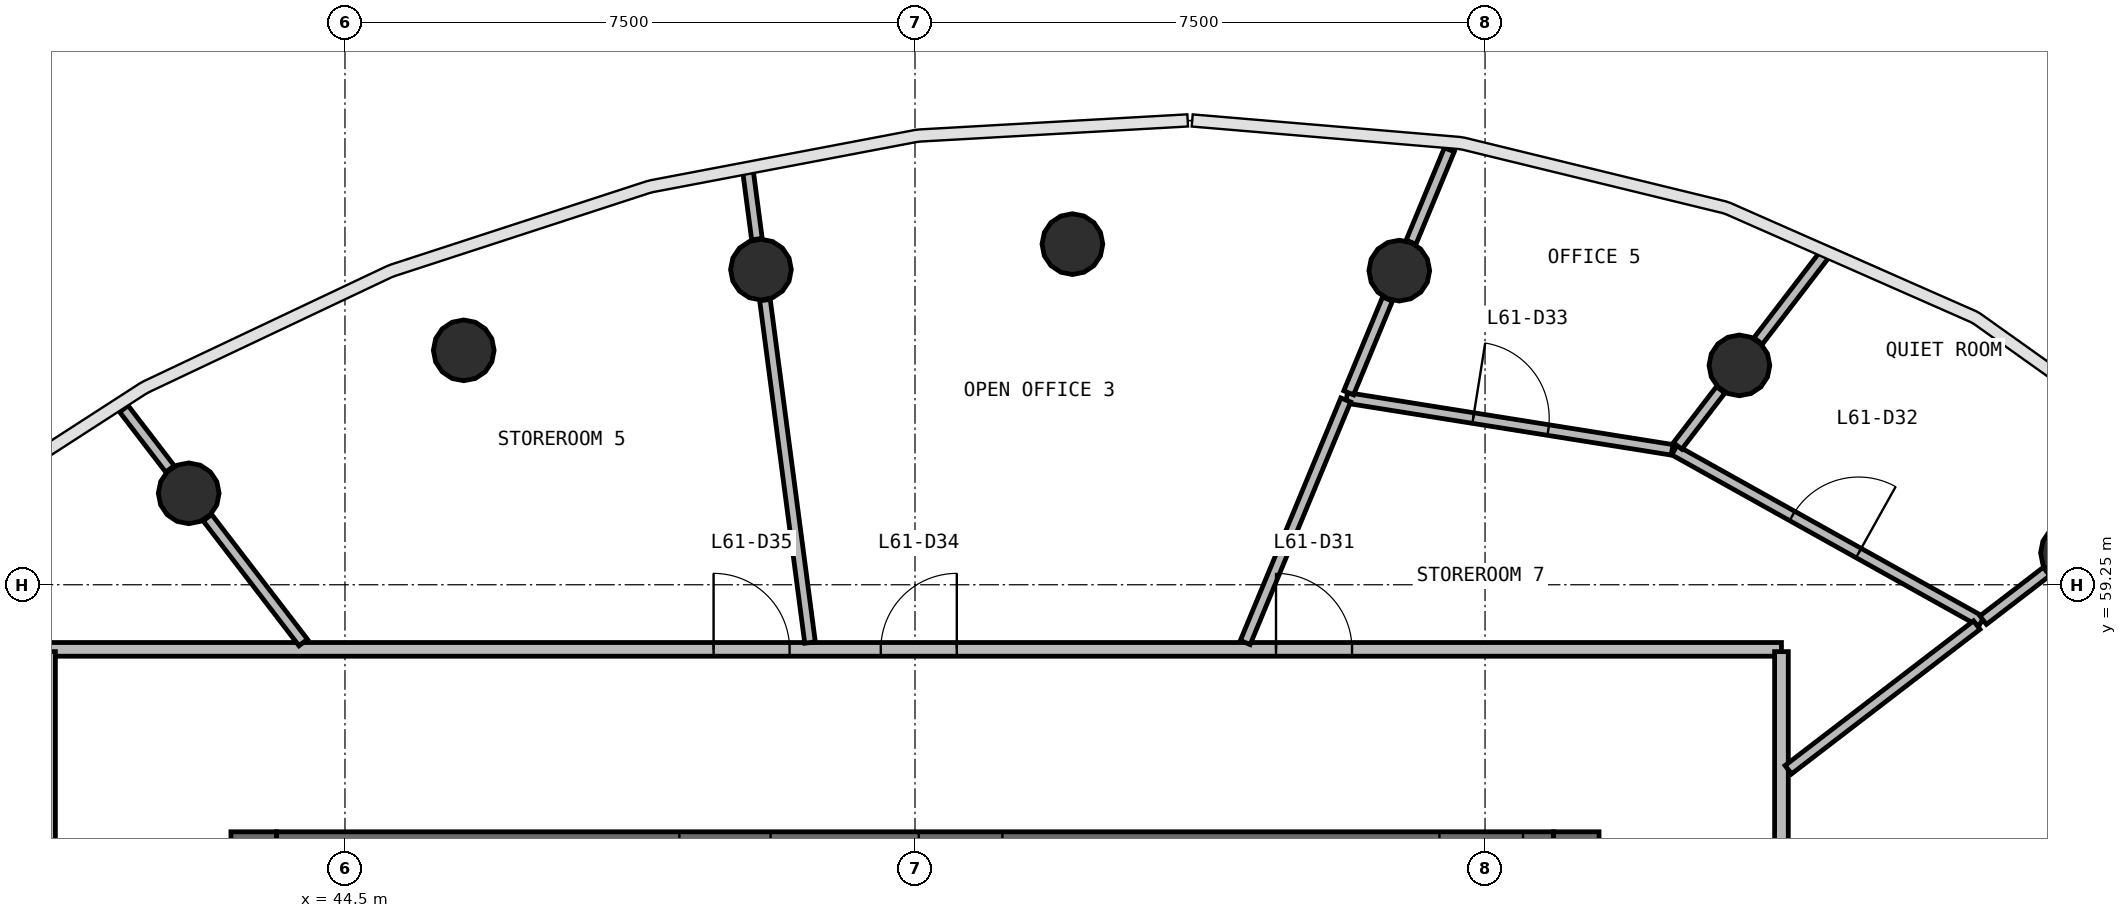
"""IFC4 building model, lengths in metres.
Left out: names, types, materials, properties, quantities, classifications, styles, units other than length and angle.
Written with IfcOpenShell. Run it as: python <this file> out.ifc"""

import sys

from ifc_helpers import new_model, si_unit, direction, frame, frame_2d, origin, origin_2d, place, context, subcontext, project, spatial, rectangle, circle, extrude, source, transform, mapped, element, fill, save


model = new_model("IFC4")
c1 = context("Model", 3, precision=1e-05, world=origin(), true_north=direction((0.0, 1.0)))
c2 = subcontext(c1, "Body", "Model", "MODEL_VIEW")
j1 = project(units=[si_unit("LENGTHUNIT", "METRE"), si_unit("PLANEANGLEUNIT", "RADIAN")], contexts=[c1])
p1 = place(None, origin())
s1 = spatial("IfcSite", under=j1, at=p1, CompositionType="ELEMENT")
p2 = place(p1, origin())
s2 = spatial("IfcBuilding", under=s1, at=p2, CompositionType="ELEMENT")
p3 = place(p2, frame((0.0, 0.0, 250.1)))
s3 = spatial("IfcBuildingStorey", under=s2, at=p3, CompositionType="ELEMENT", Elevation=250.1)
p4 = place(p3, frame((60.7, 40.0, 0.0), z_axis=(0.0, 0.0, 1.0), x_axis=(0.0, 1.0, 0.0)))
e1 = element("IfcWall", 1, at=p4, inside=s3, PredefinedType="SHEAR", context=c2, shape_type="SweptSolid", body=[
    extrude(rectangle(XDim=16.0, YDim=0.6, at=frame_2d((8.0, 0.0))), origin(), (0.0, 0.0, 1.0), 3.9),
])
p5 = place(p4, frame((7.1, 0.0, 0.0)))
e2 = element("IfcOpeningElement", 2, at=p5, cuts=e1, PredefinedType="OPENING", context=c2, shape_type="SweptSolid", body=[
    extrude(rectangle(XDim=1.8, YDim=2.1, at=frame_2d((0.9, 1.05))), frame((0.0, 0.31, 0.0), z_axis=(0.0, -1.0, 0.0), x_axis=(1.0, 0.0, 0.0)), (0.0, 0.0, 1.0), 0.62),
])
p6 = place(p3, frame((43.3, 56.0, 0.0), z_axis=(0.0, 0.0, 1.0), x_axis=(0.0, -1.0, 0.0)))
e3 = element("IfcWall", 3, at=p6, inside=s3, PredefinedType="SHEAR", context=c2, shape_type="SweptSolid", body=[
    extrude(rectangle(XDim=16.0, YDim=0.6, at=frame_2d((8.0, 0.0))), origin(), (0.0, 0.0, 1.0), 3.9),
])
p7 = place(p6, frame((7.1, 0.0, 0.0)))
e4 = element("IfcOpeningElement", 4, at=p7, cuts=e3, PredefinedType="OPENING", context=c2, shape_type="SweptSolid", body=[
    extrude(rectangle(XDim=1.8, YDim=2.1, at=frame_2d((0.9, 1.05))), frame((0.0, 0.31, 0.0), z_axis=(0.0, -1.0, 0.0), x_axis=(1.0, 0.0, 0.0)), (0.0, 0.0, 1.0), 0.62),
])
p8 = place(p3, frame((60.4, 55.7, 0.0), z_axis=(0.0, 0.0, 1.0), x_axis=(-1.0, 0.0, 0.0)))
e5 = element("IfcWall", 5, at=p8, inside=s3, PredefinedType="SHEAR", context=c2, shape_type="SweptSolid", body=[
    extrude(rectangle(XDim=16.8, YDim=0.6, at=frame_2d((8.4, 0.0))), origin(), (0.0, 0.0, 1.0), 3.9),
])
p9 = place(p8, frame((0.4, 0.0, 0.0)))
e6 = element("IfcOpeningElement", 6, at=p9, cuts=e5, PredefinedType="OPENING", context=c2, shape_type="SweptSolid", body=[
    extrude(rectangle(XDim=1.1, YDim=2.1, at=frame_2d((0.55, 1.05))), frame((0.0, 0.31, 0.0), z_axis=(0.0, -1.0, 0.0), x_axis=(1.0, 0.0, 0.0)), (0.0, 0.0, 1.0), 0.62),
])
p10 = place(p8, frame((10.3, 0.0, 0.0)))
e7 = element("IfcOpeningElement", 7, at=p10, cuts=e5, PredefinedType="OPENING", context=c2, shape_type="SweptSolid", body=[
    extrude(rectangle(XDim=1.2, YDim=2.1, at=frame_2d((0.6, 1.05))), frame((0.0, 0.31, 0.0), z_axis=(0.0, -1.0, 0.0), x_axis=(1.0, 0.0, 0.0)), (0.0, 0.0, 1.0), 0.62),
])
p11 = place(p8, frame((7.25, 0.0, 0.0)))
e8 = element("IfcOpeningElement", 8, at=p11, cuts=e5, PredefinedType="OPENING", context=c2, shape_type="SweptSolid", body=[
    extrude(rectangle(XDim=1.1, YDim=2.1, at=frame_2d((0.55, 1.05))), frame((0.0, 0.31, 0.0), z_axis=(0.0, -1.0, 0.0), x_axis=(1.0, 0.0, 0.0)), (0.0, 0.0, 1.0), 0.62),
])
m1 = source(origin(), c2, "Body", "SweptSolid", [
    extrude(circle(Radius=0.4, at=origin_2d()), origin(), (0.0, 0.0, 1.0), 3.9),
])
for number, where, z_axis, x_axis in (
    (9, (67.209, 59.671, 0.0), (0.0, 0.0, 1.0), (1.0, 0.0, 0.0)),
    (10, (62.847, 62.136, 0.0), (0.0, 0.0, 1.0), (1.0, 0.0, 0.0)),
    (11, (58.372, 63.383, 0.0), (0.0, 0.0, 1.0), (1.0, 0.0, 0.0)),
    (12, (54.071, 63.731, 0.0), (0.0, 0.0, 1.0), (1.0, 0.0, 0.0)),
    (13, (49.973, 63.396, 0.0), (0.0, 0.0, 1.0), (1.0, 0.0, 0.0)),
    (14, (46.063, 62.334, 0.0), (0.0, 0.0, 1.0), (1.0, 0.0, 0.0)),
    (15, (42.444, 60.453, 0.0), (0.0, 0.0, 1.0), (1.0, 0.0, 0.0)),
):
    element("IfcColumn", number, at=place(p3, frame(where, z_axis=z_axis, x_axis=x_axis)), inside=s3, PredefinedType="COLUMN", context=c2, shape_type="MappedRepresentation", body=[
        mapped(m1, transform((0.0, 0.0, 0.0), scale=1.0)),
    ])
p12 = place(p3, frame((40.6, 58.4, 0.0), z_axis=(0.0, 0.0, 1.0), x_axis=(1.0, 0.0, 0.0)))
e16 = element("IfcWall", 16, at=p12, inside=s3, PredefinedType="PARTITIONING", context=c2, shape_type="SweptSolid", body=[
    extrude(rectangle(XDim=22.8, YDim=0.18, at=frame_2d((11.4, 0.0))), origin(), (0.0, 0.0, 1.0), 2.88),
])
p13 = place(p12, frame((16.15, 0.0, 0.0)))
e17 = element("IfcOpeningElement", 17, at=p13, cuts=e16, PredefinedType="OPENING", context=c2, shape_type="SweptSolid", body=[
    extrude(rectangle(XDim=1.0, YDim=2.1, at=frame_2d((0.5, 1.05))), frame((0.0, 0.1, 0.0), z_axis=(0.0, -1.0, 0.0), x_axis=(1.0, 0.0, 0.0)), (0.0, 0.0, 1.0), 0.2),
])
p14 = place(p12, frame((10.95, 0.0, 0.0)))
e18 = element("IfcOpeningElement", 18, at=p14, cuts=e16, PredefinedType="OPENING", context=c2, shape_type="SweptSolid", body=[
    extrude(rectangle(XDim=1.0, YDim=2.1, at=frame_2d((0.5, 1.05))), frame((0.0, 0.1, 0.0), z_axis=(0.0, -1.0, 0.0), x_axis=(1.0, 0.0, 0.0)), (0.0, 0.0, 1.0), 0.2),
])
p15 = place(p12, frame((8.75, 0.0, 0.0)))
e19 = element("IfcOpeningElement", 19, at=p15, cuts=e16, PredefinedType="OPENING", context=c2, shape_type="SweptSolid", body=[
    extrude(rectangle(XDim=1.0, YDim=2.1, at=frame_2d((0.5, 1.05))), frame((0.0, 0.1, 0.0), z_axis=(0.0, -1.0, 0.0), x_axis=(1.0, 0.0, 0.0)), (0.0, 0.0, 1.0), 0.2),
])
p16 = place(p3, frame((63.4, 58.37, 0.0), z_axis=(0.0, 0.0, 1.0), x_axis=(0.0, -1.0, 0.0)))
e20 = element("IfcWall", 20, at=p16, inside=s3, PredefinedType="PARTITIONING", context=c2, shape_type="SweptSolid", body=[
    extrude(rectangle(XDim=20.74, YDim=0.18, at=frame_2d((10.37, 0.0))), origin(), (0.0, 0.0, 1.0), 2.88),
])
p17 = place(p16, frame((9.89, 0.0, 0.0)))
e21 = element("IfcOpeningElement", 21, at=p17, cuts=e20, PredefinedType="OPENING", context=c2, shape_type="SweptSolid", body=[
    extrude(rectangle(XDim=1.0, YDim=2.1, at=frame_2d((0.5, 1.05))), frame((0.0, 0.1, 0.0), z_axis=(0.0, -1.0, 0.0), x_axis=(1.0, 0.0, 0.0)), (0.0, 0.0, 1.0), 0.2),
])
p18 = place(p16, frame((7.69, 0.0, 0.0)))
e22 = element("IfcOpeningElement", 22, at=p18, cuts=e20, PredefinedType="OPENING", context=c2, shape_type="SweptSolid", body=[
    extrude(rectangle(XDim=1.0, YDim=2.1, at=frame_2d((0.5, 1.05))), frame((0.0, 0.1, 0.0), z_axis=(0.0, -1.0, 0.0), x_axis=(1.0, 0.0, 0.0)), (0.0, 0.0, 1.0), 0.2),
])
p19 = place(p3, frame((40.6, 37.63, 0.0), z_axis=(0.0, 0.0, 1.0), x_axis=(0.0, 1.0, 0.0)))
e23 = element("IfcWall", 23, at=p19, inside=s3, PredefinedType="PARTITIONING", context=c2, shape_type="SweptSolid", body=[
    extrude(rectangle(XDim=20.74, YDim=0.18, at=frame_2d((10.37, 0.0))), origin(), (0.0, 0.0, 1.0), 2.88),
])
p20 = place(p19, frame((7.79, 0.0, 0.0)))
e24 = element("IfcOpeningElement", 24, at=p20, cuts=e23, PredefinedType="OPENING", context=c2, shape_type="SweptSolid", body=[
    extrude(rectangle(XDim=0.9, YDim=2.1, at=frame_2d((0.45, 1.05))), frame((0.0, 0.1, 0.0), z_axis=(0.0, -1.0, 0.0), x_axis=(1.0, 0.0, 0.0)), (0.0, 0.0, 1.0), 0.2),
])
p21 = place(p19, frame((4.39, 0.0, 0.0)))
e25 = element("IfcOpeningElement", 25, at=p21, cuts=e23, PredefinedType="OPENING", context=c2, shape_type="SweptSolid", body=[
    extrude(rectangle(XDim=0.9, YDim=2.1, at=frame_2d((0.45, 1.05))), frame((0.0, 0.1, 0.0), z_axis=(0.0, -1.0, 0.0), x_axis=(1.0, 0.0, 0.0)), (0.0, 0.0, 1.0), 0.2),
])
p22 = place(p19, frame((15.49, 0.0, 0.0)))
e26 = element("IfcOpeningElement", 26, at=p22, cuts=e23, PredefinedType="OPENING", context=c2, shape_type="SweptSolid", body=[
    extrude(rectangle(XDim=1.0, YDim=2.1, at=frame_2d((0.5, 1.05))), frame((0.0, 0.1, 0.0), z_axis=(0.0, -1.0, 0.0), x_axis=(1.0, 0.0, 0.0)), (0.0, 0.0, 1.0), 0.2),
])
p23 = place(p19, frame((9.89, 0.0, 0.0)))
e27 = element("IfcOpeningElement", 27, at=p23, cuts=e23, PredefinedType="OPENING", context=c2, shape_type="SweptSolid", body=[
    extrude(rectangle(XDim=1.0, YDim=2.1, at=frame_2d((0.5, 1.05))), frame((0.0, 0.1, 0.0), z_axis=(0.0, -1.0, 0.0), x_axis=(1.0, 0.0, 0.0)), (0.0, 0.0, 1.0), 0.2),
])
p24 = place(p3, frame((50.619, 58.49, 0.0), z_axis=(0.0, 0.0, 1.0), x_axis=(-0.130505936446, 0.991447527887, 0.0)))
e28 = element("IfcWall", 28, at=p24, inside=s3, PredefinedType="PARTITIONING", context=c2, shape_type="SweptSolid", body=[
    extrude(rectangle(XDim=4.544, YDim=0.14, at=frame_2d((2.272, 0.0))), origin(), (0.0, 0.0, 1.0), 2.88),
])
p25 = place(p3, frame((61.991, 61.02, 0.0), z_axis=(0.0, 0.0, 1.0), x_axis=(0.873219638233, -0.487326854795, 0.0)))
e29 = element("IfcWall", 29, at=p25, inside=s3, PredefinedType="PARTITIONING", context=c2, shape_type="SweptSolid", body=[
    extrude(rectangle(XDim=4.626, YDim=0.14, at=frame_2d((2.313, 0.0))), origin(), (0.0, 0.0, 1.0), 2.88),
])
p26 = place(p25, frame((1.776, 0.0, 0.0)))
e30 = element("IfcOpeningElement", 30, at=p26, cuts=e29, PredefinedType="OPENING", context=c2, shape_type="SweptSolid", body=[
    extrude(rectangle(XDim=1.0, YDim=2.1, at=frame_2d((0.5, 1.05))), frame((0.0, 0.08, 0.0), z_axis=(0.0, -1.0, 0.0), x_axis=(1.0, 0.0, 0.0)), (0.0, 0.0, 1.0), 0.16),
])
p27 = place(p3, frame((57.678, 61.709, 0.0), z_axis=(0.0, 0.0, 1.0), x_axis=(0.987490815334, -0.157676534816, 0.0)))
e31 = element("IfcWall", 31, at=p27, inside=s3, PredefinedType="PARTITIONING", context=c2, shape_type="SweptSolid", body=[
    extrude(rectangle(XDim=4.337, YDim=0.14, at=frame_2d((2.168, 0.0))), origin(), (0.0, 0.0, 1.0), 2.88),
])
p28 = place(p27, frame((1.687, 0.0, 0.0)))
e32 = element("IfcOpeningElement", 32, at=p28, cuts=e31, PredefinedType="OPENING", context=c2, shape_type="SweptSolid", body=[
    extrude(rectangle(XDim=1.0, YDim=2.1, at=frame_2d((0.5, 1.05))), frame((0.0, 0.08, 0.0), z_axis=(0.0, -1.0, 0.0), x_axis=(1.0, 0.0, 0.0)), (0.0, 0.0, 1.0), 0.16),
])
p29 = place(p3, frame((56.345, 58.49, 0.0), z_axis=(0.0, 0.0, 1.0), x_axis=(0.382647254791, 0.923894516923, 0.0)))
e33 = element("IfcWall", 33, at=p29, inside=s3, PredefinedType="PARTITIONING", context=c2, shape_type="SweptSolid", body=[
    extrude(rectangle(XDim=3.454, YDim=0.14, at=frame_2d((1.727, 0.0))), origin(), (0.0, 0.0, 1.0), 2.88),
])
p30 = place(p3, frame((63.49, 56.817, 0.0), z_axis=(0.0, 0.0, 1.0), x_axis=(0.79337248494, 0.608736478404, 0.0)))
e34 = element("IfcWall", 34, at=p30, inside=s3, PredefinedType="PARTITIONING", context=c2, shape_type="SweptSolid", body=[
    extrude(rectangle(XDim=3.126, YDim=0.14, at=frame_2d((1.563, 0.0))), origin(), (0.0, 0.0, 1.0), 2.88),
])
p31 = place(p3, frame((43.951, 58.49, 0.0), z_axis=(0.0, 0.0, 1.0), x_axis=(-0.608701397958, 0.793399400128, 0.0)))
e35 = element("IfcWall", 35, at=p31, inside=s3, PredefinedType="PARTITIONING", context=c2, shape_type="SweptSolid", body=[
    extrude(rectangle(XDim=2.07, YDim=0.14, at=frame_2d((1.035, 0.0))), origin(), (0.0, 0.0, 1.0), 2.88),
])
p32 = place(p3, frame((63.093, 62.457, 0.0), z_axis=(0.0, 0.0, 1.0), x_axis=(0.608682974902, 0.793413534082, 0.0)))
e36 = element("IfcWall", 36, at=p32, inside=s3, PredefinedType="PARTITIONING", context=c2, shape_type="SweptSolid", body=[
    extrude(rectangle(XDim=1.447, YDim=0.14, at=frame_2d((0.724, 0.0))), origin(), (0.0, 0.0, 1.0), 2.88),
])
p33 = place(p3, frame((57.706, 61.775, 0.0), z_axis=(0.0, 0.0, 1.0), x_axis=(0.382718021359, 0.923865204522, 0.0)))
e37 = element("IfcWall", 37, at=p33, inside=s3, PredefinedType="PARTITIONING", context=c2, shape_type="SweptSolid", body=[
    extrude(rectangle(XDim=1.334, YDim=0.14, at=frame_2d((0.667, 0.0))), origin(), (0.0, 0.0, 1.0), 2.88),
])
p34 = place(p3, frame((58.527, 63.757, 0.0), z_axis=(0.0, 0.0, 1.0), x_axis=(0.38271770781, 0.923865334412, 0.0)))
e38 = element("IfcWall", 38, at=p34, inside=s3, PredefinedType="PARTITIONING", context=c2, shape_type="SweptSolid", body=[
    extrude(rectangle(XDim=1.316, YDim=0.14, at=frame_2d((0.658, 0.0))), origin(), (0.0, 0.0, 1.0), 2.88),
])
p35 = place(p3, frame((66.054, 58.784, 0.0), z_axis=(0.0, 0.0, 1.0), x_axis=(0.793348442071, 0.608767812441, 0.0)))
e39 = element("IfcWall", 39, at=p35, inside=s3, PredefinedType="PARTITIONING", context=c2, shape_type="SweptSolid", body=[
    extrude(rectangle(XDim=1.052, YDim=0.14, at=frame_2d((0.526, 0.0))), origin(), (0.0, 0.0, 1.0), 2.88),
])
p36 = place(p3, frame((62.034, 61.076, 0.0), z_axis=(0.0, 0.0, 1.0), x_axis=(0.608734333178, 0.793374130919, 0.0)))
e40 = element("IfcWall", 40, at=p36, inside=s3, PredefinedType="PARTITIONING", context=c2, shape_type="SweptSolid", body=[
    extrude(rectangle(XDim=0.931, YDim=0.14, at=frame_2d((0.465, 0.0))), origin(), (0.0, 0.0, 1.0), 2.88),
])
p37 = place(p3, frame((42.198, 60.774, 0.0), z_axis=(0.0, 0.0, 1.0), x_axis=(-0.608704056843, 0.793397360207, 0.0)))
e41 = element("IfcWall", 41, at=p37, inside=s3, PredefinedType="PARTITIONING", context=c2, shape_type="SweptSolid", body=[
    extrude(rectangle(XDim=0.997, YDim=0.14, at=frame_2d((0.498, 0.0))), origin(), (0.0, 0.0, 1.0), 2.88),
])
p38 = place(p3, frame((49.92, 63.797, 0.0), z_axis=(0.0, 0.0, 1.0), x_axis=(-0.130703637237, 0.991421484139, 0.0)))
e42 = element("IfcWall", 42, at=p38, inside=s3, PredefinedType="PARTITIONING", context=c2, shape_type="SweptSolid", body=[
    extrude(rectangle(XDim=0.887, YDim=0.14, at=frame_2d((0.444, 0.0))), origin(), (0.0, 0.0, 1.0), 2.88),
])
m2 = source(origin(), c2, "Body", "SweptSolid", [
    extrude(rectangle(XDim=1.0, YDim=2.1, at=frame_2d((0.5, 1.05))), frame((0.0, 0.025, 0.0), z_axis=(0.0, -1.0, 0.0), x_axis=(1.0, 0.0, 0.0)), (0.0, 0.0, 1.0), 0.05),
])
p39 = place(p13, origin())
e43 = element("IfcDoor", 43, at=p39, inside=s3, OperationType="SINGLE_SWING_LEFT", PredefinedType="DOOR", context=c2, shape_type="MappedRepresentation", body=[
    mapped(m2, transform((0.0, 0.0, 0.0), scale=1.0)),
])
fill(e17, e43)
p40 = place(p26, origin())
e44 = element("IfcDoor", 44, at=p40, inside=s3, OperationType="SINGLE_SWING_RIGHT", PredefinedType="DOOR", context=c2, shape_type="MappedRepresentation", body=[
    mapped(m2, transform((0.0, 0.0, 0.0), scale=1.0)),
])
fill(e30, e44)
p41 = place(p28, origin())
e45 = element("IfcDoor", 45, at=p41, inside=s3, OperationType="SINGLE_SWING_LEFT", PredefinedType="DOOR", context=c2, shape_type="MappedRepresentation", body=[
    mapped(m2, transform((0.0, 0.0, 0.0), scale=1.0)),
])
fill(e32, e45)
p42 = place(p14, origin())
e46 = element("IfcDoor", 46, at=p42, inside=s3, OperationType="SINGLE_SWING_RIGHT", PredefinedType="DOOR", context=c2, shape_type="MappedRepresentation", body=[
    mapped(m2, transform((0.0, 0.0, 0.0), scale=1.0)),
])
fill(e18, e46)
p43 = place(p15, origin())
e47 = element("IfcDoor", 47, at=p43, inside=s3, OperationType="SINGLE_SWING_LEFT", PredefinedType="DOOR", context=c2, shape_type="MappedRepresentation", body=[
    mapped(m2, transform((0.0, 0.0, 0.0), scale=1.0)),
])
fill(e19, e47)
save(model, sys.argv[1])
